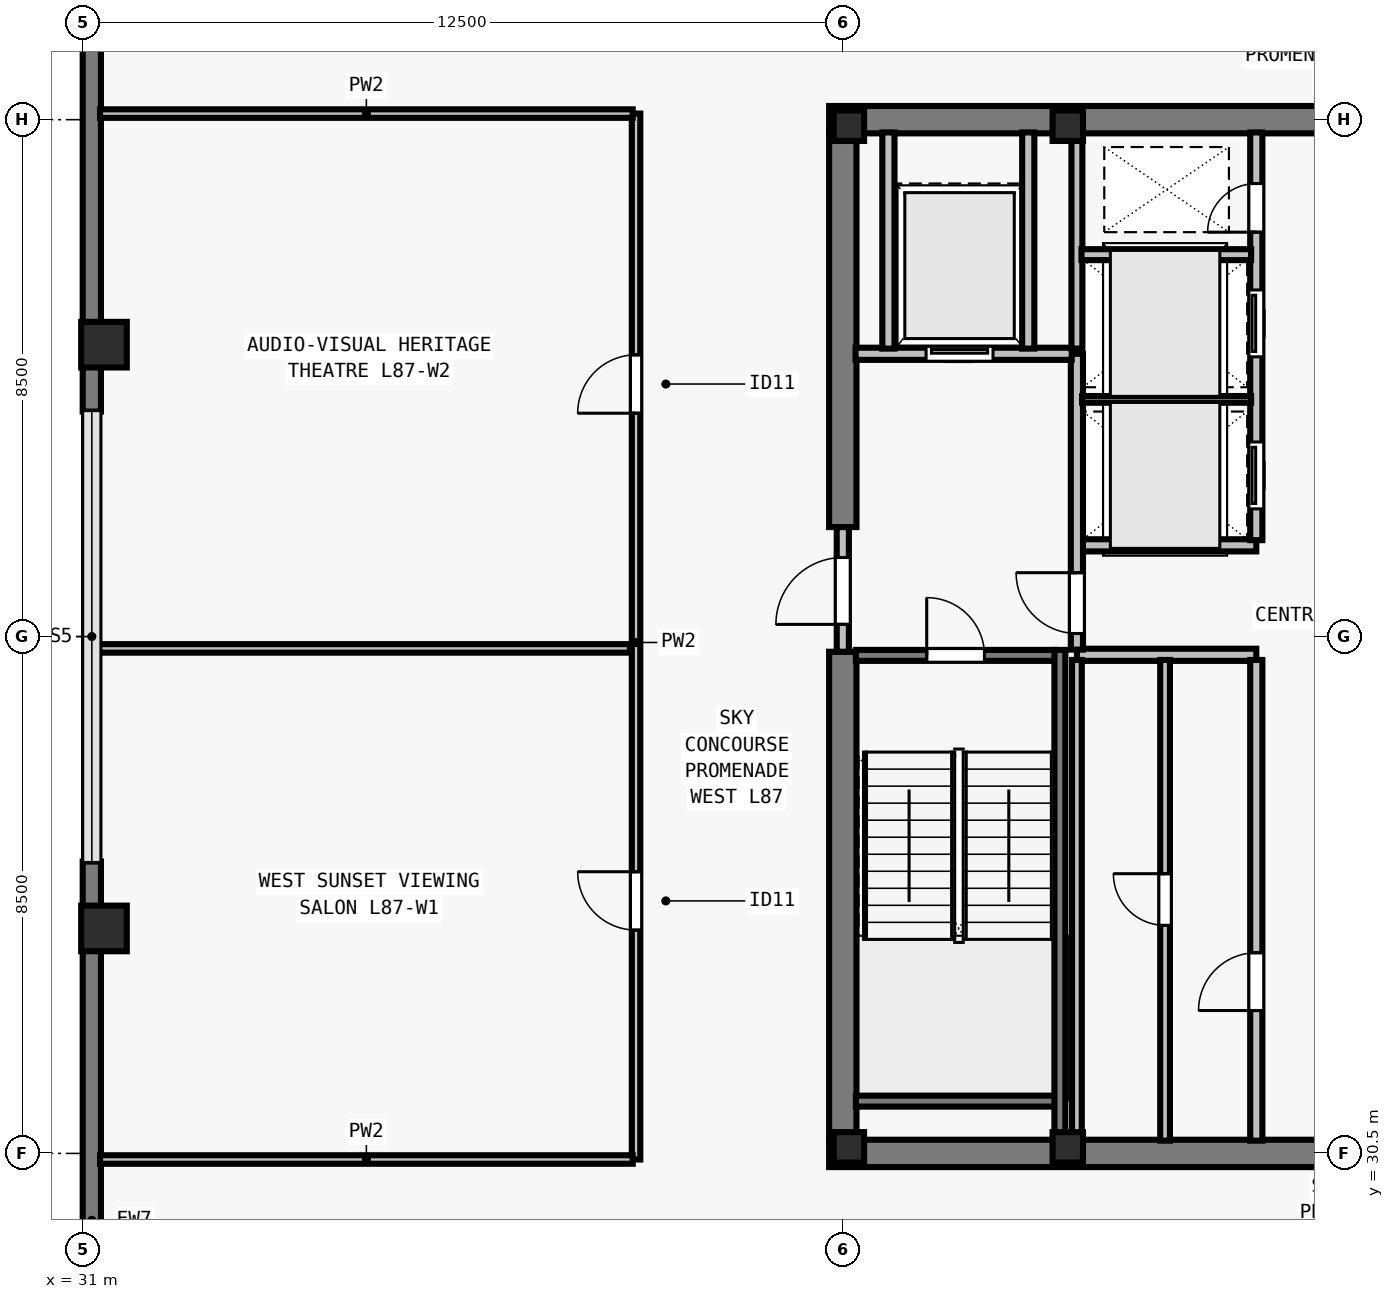
"""IFC4 building model, lengths in metres.
Left out: names, types, materials, properties, quantities, classifications, styles, units other than length and angle.
Written with IfcOpenShell. Run it as: python <this file> out.ifc"""

import sys

from ifc_helpers import new_model, si_unit, direction, frame, frame_2d, origin, origin_2d, place, context, subcontext, project, spatial, rectangle, i_section, extrude, element, fill, save


model = new_model("IFC4")
c1 = context("Model", 3, precision=1e-05, world=origin(), true_north=direction((0.0, 1.0)))
c2 = subcontext(c1, "Body", "Model", "MODEL_VIEW")
j1 = project(units=[si_unit("LENGTHUNIT", "METRE"), si_unit("PLANEANGLEUNIT", "RADIAN")], contexts=[c1])
p1 = place(None, origin())
s1 = spatial("IfcSite", under=j1, at=p1, CompositionType="ELEMENT")
p2 = place(p1, origin())
s2 = spatial("IfcBuilding", under=s1, at=p2, CompositionType="ELEMENT")
p3 = place(p2, frame((0.0, 0.0, 315.5)))
s3 = spatial("IfcBuildingStorey", under=s2, at=p3, CompositionType="ELEMENT", Elevation=315.5)
for number, where, z_axis, x_axis in (
    (1, (43.6, 30.6, 0.0), (0.0, 0.0, 1.0), (1.0, 0.0, 0.0)),
    (2, (47.2, 30.6, 0.0), (0.0, 0.0, 1.0), (1.0, 0.0, 0.0)),
    (3, (43.6, 47.4, 0.0), (0.0, 0.0, 1.0), (1.0, 0.0, 0.0)),
    (4, (47.2, 47.4, 0.0), (0.0, 0.0, 1.0), (1.0, 0.0, 0.0)),
):
    element("IfcColumn", number, at=place(p3, frame(where, z_axis=z_axis, x_axis=x_axis)), inside=s3, PredefinedType="COLUMN", context=c2, shape_type="SweptSolid", body=[
        extrude(i_section(OverallWidth=0.5, OverallDepth=0.5, WebThickness=0.028, FlangeThickness=0.045, at=origin_2d()), origin(), (0.0, 0.0, 1.0), 4.5),
    ])
for number, where, z_axis, x_axis in (
    (5, (31.35, 43.8, 0.0), (0.0, 0.0, 1.0), (0.0, 1.0, 0.0)),
    (6, (31.35, 34.2, 0.0), (0.0, 0.0, 1.0), (0.0, 1.0, 0.0)),
):
    element("IfcColumn", number, at=place(p3, frame(where, z_axis=z_axis, x_axis=x_axis)), inside=s3, PredefinedType="COLUMN", context=c2, shape_type="SweptSolid", body=[
        extrude(rectangle(XDim=0.75, YDim=0.75, at=origin_2d()), origin(), (0.0, 0.0, 1.0), 4.5),
    ])
p4 = place(p3, frame((31.15, 23.5, 0.0), z_axis=(0.0, 0.0, 1.0), x_axis=(0.0, 1.0, 0.0)))
e7 = element("IfcWall", 7, at=p4, inside=s3, PredefinedType="SOLIDWALL", context=c2, shape_type="SweptSolid", body=[
    extrude(rectangle(XDim=11.8, YDim=0.3, at=frame_2d((5.9, 0.0))), origin(), (0.0, 0.0, 1.0), 4.29),
])
p5 = place(p3, frame((31.15, 42.7, 0.0), z_axis=(0.0, 0.0, 1.0), x_axis=(0.0, 1.0, 0.0)))
e8 = element("IfcWall", 8, at=p5, inside=s3, PredefinedType="SOLIDWALL", context=c2, shape_type="SweptSolid", body=[
    extrude(rectangle(XDim=11.522, YDim=0.3, at=frame_2d((5.761, 0.0))), origin(), (0.0, 0.0, 1.0), 4.29),
])
for number, where, z_axis, x_axis in (
    (9, (43.275, 30.5, 0.0), (0.0, 0.0, 1.0), (1.0, 0.0, 0.0)),
    (10, (43.275, 47.5, 0.0), (0.0, 0.0, 1.0), (1.0, 0.0, 0.0)),
):
    element("IfcWall", number, at=place(p3, frame(where, z_axis=z_axis, x_axis=x_axis)), inside=s3, PredefinedType="SHEAR", context=c2, shape_type="SweptSolid", body=[
        extrude(rectangle(XDim=17.45, YDim=0.45, at=frame_2d((8.725, 0.0))), origin(), (0.0, 0.0, 1.0), 4.29),
    ])
p6 = place(p3, frame((43.5, 30.715, 0.0), z_axis=(0.0, 0.0, 1.0), x_axis=(0.0, 1.0, 0.0)))
e11 = element("IfcWall", 11, at=p6, inside=s3, PredefinedType="SHEAR", context=c2, shape_type="SweptSolid", body=[
    extrude(rectangle(XDim=8.035, YDim=0.45, at=frame_2d((4.018, 0.0))), origin(), (0.0, 0.0, 1.0), 4.29),
])
p7 = place(p3, frame((43.5, 40.8, 0.0), z_axis=(0.0, 0.0, 1.0), x_axis=(0.0, 1.0, 0.0)))
e12 = element("IfcWall", 12, at=p7, inside=s3, PredefinedType="SHEAR", context=c2, shape_type="SweptSolid", body=[
    extrude(rectangle(XDim=6.485, YDim=0.45, at=frame_2d((3.242, 0.0))), origin(), (0.0, 0.0, 1.0), 4.29),
])
for number, where, z_axis, x_axis in (
    (13, (47.35, 38.7, 0.0), (0.0, 0.0, 1.0), (1.0, 0.0, 0.0)),
    (14, (47.35, 40.5, 0.0), (0.0, 0.0, 1.0), (1.0, 0.0, 0.0)),
):
    element("IfcWall", number, at=place(p3, frame(where, z_axis=z_axis, x_axis=x_axis)), inside=s3, PredefinedType="SOLIDWALL", context=c2, shape_type="SweptSolid", body=[
        extrude(rectangle(XDim=2.95, YDim=0.2, at=frame_2d((1.475, 0.0))), origin(), (0.0, 0.0, 1.0), 4.29),
    ])
p8 = place(p3, frame((50.3, 30.71, 0.0), z_axis=(0.0, 0.0, 1.0), x_axis=(0.0, 1.0, 0.0)))
e15 = element("IfcWall", 15, at=p8, inside=s3, PredefinedType="SOLIDWALL", context=c2, shape_type="SweptSolid", body=[
    extrude(rectangle(XDim=7.905, YDim=0.2, at=frame_2d((3.953, 0.0))), origin(), (0.0, 0.0, 1.0), 4.29),
])
p9 = place(p8, frame((2.14, 0.0, 0.0)))
e16 = element("IfcOpeningElement", 16, at=p9, cuts=e15, PredefinedType="OPENING", context=c2, shape_type="SweptSolid", body=[
    extrude(rectangle(XDim=0.95, YDim=2.12, at=frame_2d((0.475, 1.06))), frame((0.0, 0.11, 0.0), z_axis=(0.0, -1.0, 0.0), x_axis=(1.0, 0.0, 0.0)), (0.0, 0.0, 1.0), 0.22),
])
p10 = place(p3, frame((50.3, 40.585, 0.0), z_axis=(0.0, 0.0, 1.0), x_axis=(0.0, 1.0, 0.0)))
e17 = element("IfcWall", 17, at=p10, inside=s3, PredefinedType="SOLIDWALL", context=c2, shape_type="SweptSolid", body=[
    extrude(rectangle(XDim=6.705, YDim=0.2, at=frame_2d((3.353, 0.0))), origin(), (0.0, 0.0, 1.0), 4.29),
])
p11 = place(p10, frame((0.515, 0.0, 0.0)))
e18 = element("IfcOpeningElement", 18, at=p11, cuts=e17, PredefinedType="OPENING", context=c2, shape_type="SweptSolid", body=[
    extrude(rectangle(XDim=1.1, YDim=2.2, at=frame_2d((0.55, 1.1))), frame((0.0, 0.11, 0.0), z_axis=(0.0, -1.0, 0.0), x_axis=(1.0, 0.0, 0.0)), (0.0, 0.0, 1.0), 0.22),
])
p12 = place(p10, frame((3.015, 0.0, 0.0)))
e19 = element("IfcOpeningElement", 19, at=p12, cuts=e17, PredefinedType="OPENING", context=c2, shape_type="SweptSolid", body=[
    extrude(rectangle(XDim=1.1, YDim=2.2, at=frame_2d((0.55, 1.1))), frame((0.0, 0.11, 0.0), z_axis=(0.0, -1.0, 0.0), x_axis=(1.0, 0.0, 0.0)), (0.0, 0.0, 1.0), 0.22),
])
p13 = place(p10, frame((5.065, 0.0, 0.0)))
e20 = element("IfcOpeningElement", 20, at=p13, cuts=e17, PredefinedType="OPENING", context=c2, shape_type="SweptSolid", body=[
    extrude(rectangle(XDim=0.8, YDim=2.08, at=frame_2d((0.4, 1.04))), frame((0.0, 0.11, 0.0), z_axis=(0.0, -1.0, 0.0), x_axis=(1.0, 0.0, 0.0)), (0.0, 0.0, 1.0), 0.22),
])
p14 = place(p3, frame((43.5, 38.75, 0.0), z_axis=(0.0, 0.0, 1.0), x_axis=(0.0, 1.0, 0.0)))
e21 = element("IfcWall", 21, at=p14, inside=s3, PredefinedType="SOLIDWALL", context=c2, shape_type="SweptSolid", body=[
    extrude(rectangle(XDim=2.05, YDim=0.2, at=frame_2d((1.025, 0.0))), origin(), (0.0, 0.0, 1.0), 4.29),
])
p15 = place(p14, frame((0.45, 0.0, 0.0)))
e22 = element("IfcOpeningElement", 22, at=p15, cuts=e21, PredefinedType="OPENING", context=c2, shape_type="SweptSolid", body=[
    extrude(rectangle(XDim=1.1, YDim=2.15, at=frame_2d((0.55, 1.075))), frame((0.0, 0.11, 0.0), z_axis=(0.0, -1.0, 0.0), x_axis=(1.0, 0.0, 0.0)), (0.0, 0.0, 1.0), 0.22),
])
p16 = place(p3, frame((47.35, 38.785, 0.0), z_axis=(0.0, 0.0, 1.0), x_axis=(0.0, 1.0, 0.0)))
e23 = element("IfcWall", 23, at=p16, inside=s3, PredefinedType="SOLIDWALL", context=c2, shape_type="SweptSolid", body=[
    extrude(rectangle(XDim=4.865, YDim=0.2, at=frame_2d((2.433, 0.0))), origin(), (0.0, 0.0, 1.0), 4.29),
])
p17 = place(p16, frame((0.265, 0.0, 0.0)))
e24 = element("IfcOpeningElement", 24, at=p17, cuts=e23, PredefinedType="OPENING", context=c2, shape_type="SweptSolid", body=[
    extrude(rectangle(XDim=1.0, YDim=2.15, at=frame_2d((0.5, 1.075))), frame((0.0, 0.11, 0.0), z_axis=(0.0, -1.0, 0.0), x_axis=(1.0, 0.0, 0.0)), (0.0, 0.0, 1.0), 0.22),
])
p18 = place(p3, frame((43.71, 43.65, 0.0), z_axis=(0.0, 0.0, 1.0), x_axis=(1.0, 0.0, 0.0)))
e25 = element("IfcWall", 25, at=p18, inside=s3, PredefinedType="SOLIDWALL", context=c2, shape_type="SweptSolid", body=[
    extrude(rectangle(XDim=3.555, YDim=0.2, at=frame_2d((1.777, 0.0))), origin(), (0.0, 0.0, 1.0), 4.29),
])
p19 = place(p18, frame((1.16, 0.0, 0.0)))
e26 = element("IfcOpeningElement", 26, at=p19, cuts=e25, PredefinedType="OPENING", context=c2, shape_type="SweptSolid", body=[
    extrude(rectangle(XDim=1.1, YDim=2.2, at=frame_2d((0.55, 1.1))), frame((0.0, 0.11, 0.0), z_axis=(0.0, -1.0, 0.0), x_axis=(1.0, 0.0, 0.0)), (0.0, 0.0, 1.0), 0.22),
])
for number, where, z_axis, x_axis in (
    (27, (46.55, 43.735, 0.0), (0.0, 0.0, 1.0), (0.0, 1.0, 0.0)),
    (28, (44.25, 43.735, 0.0), (0.0, 0.0, 1.0), (0.0, 1.0, 0.0)),
):
    element("IfcWall", number, at=place(p3, frame(where, z_axis=z_axis, x_axis=x_axis)), inside=s3, PredefinedType="SOLIDWALL", context=c2, shape_type="SweptSolid", body=[
        extrude(rectangle(XDim=3.555, YDim=0.2, at=frame_2d((1.777, 0.0))), origin(), (0.0, 0.0, 1.0), 4.29),
    ])
p20 = place(p3, frame((47.35, 30.71, 0.0), z_axis=(0.0, 0.0, 1.0), x_axis=(0.0, 1.0, 0.0)))
e29 = element("IfcWall", 29, at=p20, inside=s3, PredefinedType="PARTITIONING", context=c2, shape_type="SweptSolid", body=[
    extrude(rectangle(XDim=7.905, YDim=0.16, at=frame_2d((3.953, 0.0))), origin(), (0.0, 0.0, 1.0), 4.29),
])
p21 = place(p3, frame((48.8, 30.71, 0.0), z_axis=(0.0, 0.0, 1.0), x_axis=(0.0, 1.0, 0.0)))
e30 = element("IfcWall", 30, at=p21, inside=s3, PredefinedType="PARTITIONING", context=c2, shape_type="SweptSolid", body=[
    extrude(rectangle(XDim=7.905, YDim=0.16, at=frame_2d((3.953, 0.0))), origin(), (0.0, 0.0, 1.0), 4.29),
])
p22 = place(p21, frame((3.54, 0.0, 0.0)))
e31 = element("IfcOpeningElement", 31, at=p22, cuts=e30, PredefinedType="OPENING", context=c2, shape_type="SweptSolid", body=[
    extrude(rectangle(XDim=0.85, YDim=2.12, at=frame_2d((0.425, 1.06))), frame((0.0, 0.09, 0.0), z_axis=(0.0, -1.0, 0.0), x_axis=(1.0, 0.0, 0.0)), (0.0, 0.0, 1.0), 0.18),
])
p23 = place(p3, frame((47.35, 43.735, 0.0), z_axis=(0.0, 0.0, 1.0), x_axis=(0.0, 1.0, 0.0)))
e32 = element("IfcWall", 32, at=p23, inside=s3, PredefinedType="SOLIDWALL", context=c2, shape_type="SweptSolid", body=[
    extrude(rectangle(XDim=3.555, YDim=0.18, at=frame_2d((1.777, 0.0))), origin(), (0.0, 0.0, 1.0), 4.29),
])
p24 = place(p3, frame((47.435, 42.9, 0.0), z_axis=(0.0, 0.0, 1.0), x_axis=(1.0, 0.0, 0.0)))
e33 = element("IfcWall", 33, at=p24, inside=s3, PredefinedType="PARTITIONING", context=c2, shape_type="SweptSolid", body=[
    extrude(rectangle(XDim=2.78, YDim=0.11, at=frame_2d((1.39, 0.0))), origin(), (0.0, 0.0, 1.0), 4.29),
])
p25 = place(p3, frame((47.425, 45.28, 0.0), z_axis=(0.0, 0.0, 1.0), x_axis=(1.0, 0.0, 0.0)))
e34 = element("IfcWall", 34, at=p25, inside=s3, PredefinedType="SOLIDWALL", context=c2, shape_type="SweptSolid", body=[
    extrude(rectangle(XDim=2.79, YDim=0.18, at=frame_2d((1.395, 0.0))), origin(), (0.0, 0.0, 1.0), 4.29),
])
p26 = place(p3, frame((40.1, 30.4, 0.0), z_axis=(0.0, 0.0, 1.0), x_axis=(0.0, 1.0, 0.0)))
e35 = element("IfcWall", 35, at=p26, inside=s3, PredefinedType="PARTITIONING", context=c2, shape_type="SweptSolid", body=[
    extrude(rectangle(XDim=17.2, YDim=0.14, at=frame_2d((8.6, 0.0))), origin(), (0.0, 0.0, 1.0), 4.009),
])
p27 = place(p26, frame((3.772, 0.0, 0.0)))
e36 = element("IfcOpeningElement", 36, at=p27, cuts=e35, PredefinedType="OPENING", context=c2, shape_type="SweptSolid", body=[
    extrude(rectangle(XDim=0.96, YDim=2.12, at=frame_2d((0.48, 1.06))), frame((0.0, 0.08, 0.0), z_axis=(0.0, -1.0, 0.0), x_axis=(1.0, 0.0, 0.0)), (0.0, 0.0, 1.0), 0.16),
])
p28 = place(p26, frame((12.272, 0.0, 0.0)))
e37 = element("IfcOpeningElement", 37, at=p28, cuts=e35, PredefinedType="OPENING", context=c2, shape_type="SweptSolid", body=[
    extrude(rectangle(XDim=0.96, YDim=2.12, at=frame_2d((0.48, 1.06))), frame((0.0, 0.08, 0.0), z_axis=(0.0, -1.0, 0.0), x_axis=(1.0, 0.0, 0.0)), (0.0, 0.0, 1.0), 0.16),
])
for number, where, z_axis, x_axis in (
    (38, (31.285, 30.4, 0.0), (0.0, 0.0, 1.0), (1.0, 0.0, 0.0)),
    (39, (31.285, 47.6, 0.0), (0.0, 0.0, 1.0), (1.0, 0.0, 0.0)),
):
    element("IfcWall", number, at=place(p3, frame(where, z_axis=z_axis, x_axis=x_axis)), inside=s3, PredefinedType="PARTITIONING", context=c2, shape_type="SweptSolid", body=[
        extrude(rectangle(XDim=8.76, YDim=0.14, at=frame_2d((4.38, 0.0))), origin(), (0.0, 0.0, 1.0), 4.29),
    ])
p29 = place(p3, frame((31.17, 38.805, 0.0), z_axis=(0.0, 0.0, 1.0), x_axis=(1.0, 0.0, 0.0)))
e40 = element("IfcWall", 40, at=p29, inside=s3, PredefinedType="PARTITIONING", context=c2, shape_type="SweptSolid", body=[
    extrude(rectangle(XDim=8.83, YDim=0.14, at=frame_2d((4.415, 0.0))), origin(), (0.0, 0.0, 1.0), 4.29),
])
p30 = place(p3, frame((43.715, 38.69, 0.0), z_axis=(0.0, 0.0, 1.0), x_axis=(1.0, 0.0, 0.0)))
e41 = element("IfcWall", 41, at=p30, inside=s3, PredefinedType="SOLIDWALL", context=c2, shape_type="SweptSolid", body=[
    extrude(rectangle(XDim=3.28, YDim=0.18, at=frame_2d((1.64, 0.0))), origin(), (0.0, 0.0, 1.0), 4.29),
])
p31 = place(p30, frame((1.165, 0.0, 0.0)))
e42 = element("IfcOpeningElement", 42, at=p31, cuts=e41, PredefinedType="OPENING", context=c2, shape_type="SweptSolid", body=[
    extrude(rectangle(XDim=0.95, YDim=2.15, at=frame_2d((0.475, 1.075))), frame((0.0, 0.1, 0.0), z_axis=(0.0, -1.0, 0.0), x_axis=(1.0, 0.0, 0.0)), (0.0, 0.0, 1.0), 0.2),
])
p32 = place(p3, frame((43.715, 31.36, 0.0), z_axis=(0.0, 0.0, 1.0), x_axis=(1.0, 0.0, 0.0)))
e43 = element("IfcWall", 43, at=p32, inside=s3, PredefinedType="SOLIDWALL", context=c2, shape_type="SweptSolid", body=[
    extrude(rectangle(XDim=3.28, YDim=0.18, at=frame_2d((1.64, 0.0))), origin(), (0.0, 0.0, 1.0), 4.29),
])
p33 = place(p3, frame((47.07, 38.78, 0.0), z_axis=(0.0, 0.0, 1.0), x_axis=(0.0, -1.0, 0.0)))
e44 = element("IfcWall", 44, at=p33, inside=s3, PredefinedType="SOLIDWALL", context=c2, shape_type="SweptSolid", body=[
    extrude(rectangle(XDim=8.067, YDim=0.18, at=frame_2d((4.034, 0.0))), origin(), (0.0, 0.0, 1.0), 4.29),
])
p34 = place(p15, origin())
e45 = element("IfcDoor", 45, at=p34, inside=s3, OperationType="SINGLE_SWING_LEFT", PredefinedType="DOOR", context=c2, shape_type="SweptSolid", body=[
    extrude(rectangle(XDim=1.1, YDim=2.15, at=frame_2d((0.55, 1.075))), frame((0.0, 0.025, 0.0), z_axis=(0.0, -1.0, 0.0), x_axis=(1.0, 0.0, 0.0)), (0.0, 0.0, 1.0), 0.05),
])
fill(e22, e45)
p35 = place(p17, origin())
e46 = element("IfcDoor", 46, at=p35, inside=s3, OperationType="SINGLE_SWING_RIGHT", PredefinedType="DOOR", context=c2, shape_type="SweptSolid", body=[
    extrude(rectangle(XDim=1.0, YDim=2.15, at=frame_2d((0.5, 1.075))), frame((0.0, 0.025, 0.0), z_axis=(0.0, -1.0, 0.0), x_axis=(1.0, 0.0, 0.0)), (0.0, 0.0, 1.0), 0.05),
])
fill(e24, e46)
p36 = place(p19, origin())
e47 = element("IfcDoor", 47, at=p36, inside=s3, OperationType="SLIDING_TO_LEFT", PredefinedType="DOOR", context=c2, shape_type="SweptSolid", body=[
    extrude(rectangle(XDim=1.1, YDim=2.2, at=frame_2d((0.55, 1.1))), frame((0.0, 0.025, 0.0), z_axis=(0.0, -1.0, 0.0), x_axis=(1.0, 0.0, 0.0)), (0.0, 0.0, 1.0), 0.05),
])
fill(e26, e47)
p37 = place(p9, origin())
e48 = element("IfcDoor", 48, at=p37, inside=s3, OperationType="SINGLE_SWING_LEFT", PredefinedType="DOOR", context=c2, shape_type="SweptSolid", body=[
    extrude(rectangle(XDim=0.95, YDim=2.12, at=frame_2d((0.475, 1.06))), frame((0.0, 0.025, 0.0), z_axis=(0.0, -1.0, 0.0), x_axis=(1.0, 0.0, 0.0)), (0.0, 0.0, 1.0), 0.05),
])
fill(e16, e48)
p38 = place(p22, origin())
e49 = element("IfcDoor", 49, at=p38, inside=s3, OperationType="SINGLE_SWING_RIGHT", PredefinedType="DOOR", context=c2, shape_type="SweptSolid", body=[
    extrude(rectangle(XDim=0.85, YDim=2.12, at=frame_2d((0.425, 1.06))), frame((0.0, 0.025, 0.0), z_axis=(0.0, -1.0, 0.0), x_axis=(1.0, 0.0, 0.0)), (0.0, 0.0, 1.0), 0.05),
])
fill(e31, e49)
p39 = place(p11, origin())
e50 = element("IfcDoor", 50, at=p39, inside=s3, OperationType="SLIDING_TO_LEFT", PredefinedType="DOOR", context=c2, shape_type="SweptSolid", body=[
    extrude(rectangle(XDim=1.1, YDim=2.2, at=frame_2d((0.55, 1.1))), frame((0.0, 0.025, 0.0), z_axis=(0.0, -1.0, 0.0), x_axis=(1.0, 0.0, 0.0)), (0.0, 0.0, 1.0), 0.05),
])
fill(e18, e50)
p40 = place(p12, origin())
e51 = element("IfcDoor", 51, at=p40, inside=s3, OperationType="SLIDING_TO_LEFT", PredefinedType="DOOR", context=c2, shape_type="SweptSolid", body=[
    extrude(rectangle(XDim=1.1, YDim=2.2, at=frame_2d((0.55, 1.1))), frame((0.0, 0.025, 0.0), z_axis=(0.0, -1.0, 0.0), x_axis=(1.0, 0.0, 0.0)), (0.0, 0.0, 1.0), 0.05),
])
fill(e19, e51)
p41 = place(p13, origin())
e52 = element("IfcDoor", 52, at=p41, inside=s3, OperationType="SINGLE_SWING_LEFT", PredefinedType="DOOR", context=c2, shape_type="SweptSolid", body=[
    extrude(rectangle(XDim=0.8, YDim=2.08, at=frame_2d((0.4, 1.04))), frame((0.0, 0.025, 0.0), z_axis=(0.0, -1.0, 0.0), x_axis=(1.0, 0.0, 0.0)), (0.0, 0.0, 1.0), 0.05),
])
fill(e20, e52)
p42 = place(p27, origin())
e53 = element("IfcDoor", 53, at=p42, inside=s3, OperationType="SINGLE_SWING_RIGHT", PredefinedType="DOOR", context=c2, shape_type="SweptSolid", body=[
    extrude(rectangle(XDim=0.96, YDim=2.12, at=frame_2d((0.48, 1.06))), frame((0.0, 0.025, 0.0), z_axis=(0.0, -1.0, 0.0), x_axis=(1.0, 0.0, 0.0)), (0.0, 0.0, 1.0), 0.05),
])
fill(e36, e53)
p43 = place(p28, origin())
e54 = element("IfcDoor", 54, at=p43, inside=s3, OperationType="SINGLE_SWING_LEFT", PredefinedType="DOOR", context=c2, shape_type="SweptSolid", body=[
    extrude(rectangle(XDim=0.96, YDim=2.12, at=frame_2d((0.48, 1.06))), frame((0.0, 0.025, 0.0), z_axis=(0.0, -1.0, 0.0), x_axis=(1.0, 0.0, 0.0)), (0.0, 0.0, 1.0), 0.05),
])
fill(e37, e54)
p44 = place(p31, origin())
e55 = element("IfcDoor", 55, at=p44, inside=s3, OperationType="SINGLE_SWING_LEFT", PredefinedType="DOOR", context=c2, shape_type="SweptSolid", body=[
    extrude(rectangle(XDim=0.95, YDim=2.15, at=frame_2d((0.475, 1.075))), frame((0.0, 0.025, 0.0), z_axis=(0.0, -1.0, 0.0), x_axis=(1.0, 0.0, 0.0)), (0.0, 0.0, 1.0), 0.05),
])
fill(e42, e55)
save(model, sys.argv[1])
